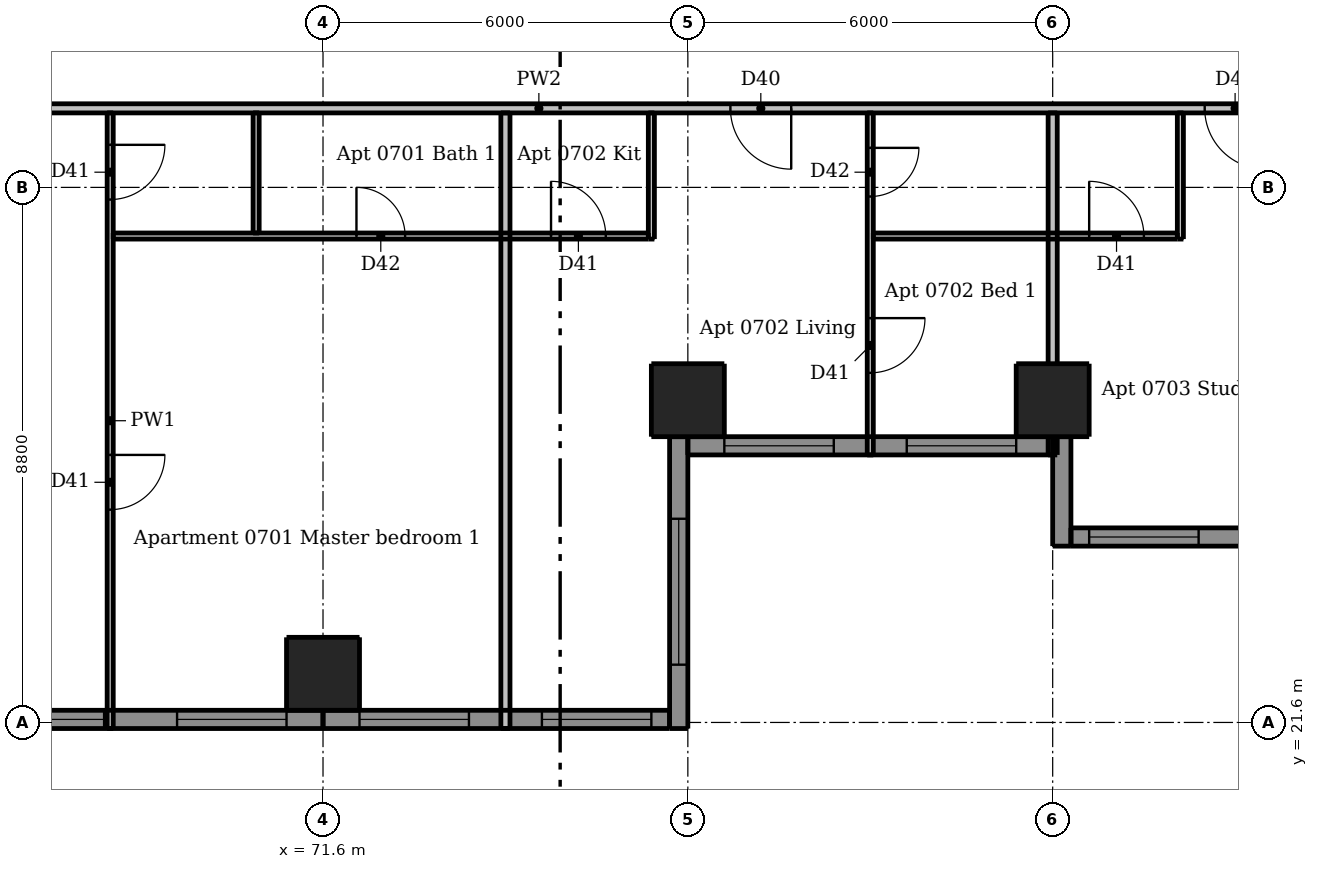
"""IFC4 building model, lengths in metres.
Left out: names, types, materials, properties, quantities, classifications, styles, units other than length and angle.
Written with IfcOpenShell. Run it as: python <this file> out.ifc"""

import sys

from ifc_helpers import new_model, si_unit, direction, frame, frame_2d, origin, origin_2d, place, context, subcontext, project, spatial, rectangle, extrude, element, fill, save


model = new_model("IFC4")
c1 = context("Model", 3, precision=1e-05, world=origin(), true_north=direction((0.0, 1.0)))
c2 = subcontext(c1, "Body", "Model", "MODEL_VIEW")
j1 = project(units=[si_unit("LENGTHUNIT", "METRE"), si_unit("PLANEANGLEUNIT", "RADIAN")], contexts=[c1])
p1 = place(None, origin())
s1 = spatial("IfcSite", under=j1, at=p1, CompositionType="ELEMENT")
p2 = place(p1, origin())
s2 = spatial("IfcBuilding", under=s1, at=p2, CompositionType="ELEMENT")
p3 = place(p2, frame((0.0, 0.0, 30.1)))
s3 = spatial("IfcBuildingStorey", under=s2, at=p3, CompositionType="ELEMENT", Elevation=30.1)
for number, where, z_axis, x_axis in (
    (1, (71.6, 22.4, 0.0), (0.0, 0.0, 1.0), (1.0, 0.0, 0.0)),
    (2, (77.6, 26.9, 0.0), (0.0, 0.0, 1.0), (1.0, 0.0, 0.0)),
    (3, (83.6, 26.9, 0.0), (0.0, 0.0, 1.0), (1.0, 0.0, 0.0)),
):
    element("IfcColumn", number, at=place(p3, frame(where, z_axis=z_axis, x_axis=x_axis)), inside=s3, PredefinedType="COLUMN", context=c2, shape_type="SweptSolid", body=[
        extrude(rectangle(XDim=1.2, YDim=1.2, at=origin_2d()), origin(), (0.0, 0.0, 1.0), 3.05),
    ])
p4 = place(p3, frame((77.45, 21.5, 0.0), z_axis=(0.0, 0.0, 1.0), x_axis=(0.0, 1.0, 0.0)))
e4 = element("IfcWall", 4, at=p4, inside=s3, PredefinedType="SOLIDWALL", context=c2, shape_type="SweptSolid", body=[
    extrude(rectangle(XDim=4.8, YDim=0.3, at=frame_2d((2.4, 0.0))), origin(), (0.0, 0.0, 1.0), 3.05),
])
p5 = place(p4, frame((1.05, 0.0, 0.15)))
e5 = element("IfcOpeningElement", 5, at=p5, cuts=e4, PredefinedType="OPENING", context=c2, shape_type="SweptSolid", body=[
    extrude(rectangle(XDim=2.4, YDim=2.1, at=frame_2d((1.2, 1.05))), frame((0.0, 0.16, 0.0), z_axis=(0.0, -1.0, 0.0), x_axis=(1.0, 0.0, 0.0)), (0.0, 0.0, 1.0), 0.32),
])
p6 = place(p3, frame((83.75, 26.3, 0.0), z_axis=(0.0, 0.0, 1.0), x_axis=(0.0, -1.0, 0.0)))
e6 = element("IfcWall", 6, at=p6, inside=s3, PredefinedType="SOLIDWALL", context=c2, shape_type="SweptSolid", body=[
    extrude(rectangle(XDim=1.8, YDim=0.3, at=frame_2d((0.9, 0.0))), origin(), (0.0, 0.0, 1.0), 3.05),
])
p7 = place(p3, frame((65.6, 21.65, 0.0), z_axis=(0.0, 0.0, 1.0), x_axis=(1.0, 0.0, 0.0)))
e7 = element("IfcWall", 7, at=p7, inside=s3, PredefinedType="SOLIDWALL", context=c2, shape_type="SweptSolid", body=[
    extrude(rectangle(XDim=6.0, YDim=0.3, at=frame_2d((3.0, 0.0))), origin(), (0.0, 0.0, 1.0), 3.05),
])
p8 = place(p7, frame((0.6, 0.0, 0.15)))
e8 = element("IfcOpeningElement", 8, at=p8, cuts=e7, PredefinedType="OPENING", context=c2, shape_type="SweptSolid", body=[
    extrude(rectangle(XDim=1.8, YDim=2.1, at=frame_2d((0.9, 1.05))), frame((0.0, 0.16, 0.0), z_axis=(0.0, -1.0, 0.0), x_axis=(1.0, 0.0, 0.0)), (0.0, 0.0, 1.0), 0.32),
])
p9 = place(p7, frame((3.6, 0.0, 0.15)))
e9 = element("IfcOpeningElement", 9, at=p9, cuts=e7, PredefinedType="OPENING", context=c2, shape_type="SweptSolid", body=[
    extrude(rectangle(XDim=1.8, YDim=2.1, at=frame_2d((0.9, 1.05))), frame((0.0, 0.16, 0.0), z_axis=(0.0, -1.0, 0.0), x_axis=(1.0, 0.0, 0.0)), (0.0, 0.0, 1.0), 0.32),
])
p10 = place(p3, frame((71.6, 21.65, 0.0), z_axis=(0.0, 0.0, 1.0), x_axis=(1.0, 0.0, 0.0)))
e10 = element("IfcWall", 10, at=p10, inside=s3, PredefinedType="SOLIDWALL", context=c2, shape_type="SweptSolid", body=[
    extrude(rectangle(XDim=5.7, YDim=0.3, at=frame_2d((2.85, 0.0))), origin(), (0.0, 0.0, 1.0), 3.05),
])
p11 = place(p10, frame((0.6, 0.0, 0.15)))
e11 = element("IfcOpeningElement", 11, at=p11, cuts=e10, PredefinedType="OPENING", context=c2, shape_type="SweptSolid", body=[
    extrude(rectangle(XDim=1.8, YDim=2.1, at=frame_2d((0.9, 1.05))), frame((0.0, 0.16, 0.0), z_axis=(0.0, -1.0, 0.0), x_axis=(1.0, 0.0, 0.0)), (0.0, 0.0, 1.0), 0.32),
])
p12 = place(p10, frame((3.6, 0.0, 0.15)))
e12 = element("IfcOpeningElement", 12, at=p12, cuts=e10, PredefinedType="OPENING", context=c2, shape_type="SweptSolid", body=[
    extrude(rectangle(XDim=1.8, YDim=2.1, at=frame_2d((0.9, 1.05))), frame((0.0, 0.16, 0.0), z_axis=(0.0, -1.0, 0.0), x_axis=(1.0, 0.0, 0.0)), (0.0, 0.0, 1.0), 0.32),
])
p13 = place(p3, frame((77.6, 26.15, 0.0), z_axis=(0.0, 0.0, 1.0), x_axis=(1.0, 0.0, 0.0)))
e13 = element("IfcWall", 13, at=p13, inside=s3, PredefinedType="SOLIDWALL", context=c2, shape_type="SweptSolid", body=[
    extrude(rectangle(XDim=6.0, YDim=0.3, at=frame_2d((3.0, 0.0))), origin(), (0.0, 0.0, 1.0), 3.05),
])
p14 = place(p13, frame((0.6, 0.0, 0.15)))
e14 = element("IfcOpeningElement", 14, at=p14, cuts=e13, PredefinedType="OPENING", context=c2, shape_type="SweptSolid", body=[
    extrude(rectangle(XDim=1.8, YDim=2.1, at=frame_2d((0.9, 1.05))), frame((0.0, 0.16, 0.0), z_axis=(0.0, -1.0, 0.0), x_axis=(1.0, 0.0, 0.0)), (0.0, 0.0, 1.0), 0.32),
])
p15 = place(p13, frame((3.6, 0.0, 0.15)))
e15 = element("IfcOpeningElement", 15, at=p15, cuts=e13, PredefinedType="OPENING", context=c2, shape_type="SweptSolid", body=[
    extrude(rectangle(XDim=1.8, YDim=2.1, at=frame_2d((0.9, 1.05))), frame((0.0, 0.16, 0.0), z_axis=(0.0, -1.0, 0.0), x_axis=(1.0, 0.0, 0.0)), (0.0, 0.0, 1.0), 0.32),
])
p16 = place(p3, frame((83.9, 24.65, 0.0), z_axis=(0.0, 0.0, 1.0), x_axis=(1.0, 0.0, 0.0)))
e16 = element("IfcWall", 16, at=p16, inside=s3, PredefinedType="SOLIDWALL", context=c2, shape_type="SweptSolid", body=[
    extrude(rectangle(XDim=6.0, YDim=0.3, at=frame_2d((3.0, 0.0))), origin(), (0.0, 0.0, 1.0), 3.05),
])
p17 = place(p16, frame((0.3, 0.0, 0.15)))
e17 = element("IfcOpeningElement", 17, at=p17, cuts=e16, PredefinedType="OPENING", context=c2, shape_type="SweptSolid", body=[
    extrude(rectangle(XDim=1.8, YDim=2.1, at=frame_2d((0.9, 1.05))), frame((0.0, 0.16, 0.0), z_axis=(0.0, -1.0, 0.0), x_axis=(1.0, 0.0, 0.0)), (0.0, 0.0, 1.0), 0.32),
])
p18 = place(p16, frame((3.3, 0.0, 0.15)))
e18 = element("IfcOpeningElement", 18, at=p18, cuts=e16, PredefinedType="OPENING", context=c2, shape_type="SweptSolid", body=[
    extrude(rectangle(XDim=1.8, YDim=2.1, at=frame_2d((0.9, 1.05))), frame((0.0, 0.16, 0.0), z_axis=(0.0, -1.0, 0.0), x_axis=(1.0, 0.0, 0.0)), (0.0, 0.0, 1.0), 0.32),
])
p19 = place(p3, frame((68.1, 31.625, 0.0), z_axis=(0.0, 0.0, 1.0), x_axis=(0.0, -1.0, 0.0)))
e19 = element("IfcWall", 19, at=p19, inside=s3, PredefinedType="PARTITIONING", context=c2, shape_type="SweptSolid", body=[
    extrude(rectangle(XDim=10.125, YDim=0.1, at=frame_2d((5.062, 0.0))), origin(), (0.0, 0.0, 1.0), 3.05),
])
p20 = place(p19, frame((0.525, 0.0, 0.0)))
e20 = element("IfcOpeningElement", 20, at=p20, cuts=e19, PredefinedType="OPENING", context=c2, shape_type="SweptSolid", body=[
    extrude(rectangle(XDim=0.9, YDim=2.1, at=frame_2d((0.45, 1.05))), frame((0.0, 0.06, 0.0), z_axis=(0.0, -1.0, 0.0), x_axis=(1.0, 0.0, 0.0)), (0.0, 0.0, 1.0), 0.12),
])
p21 = place(p19, frame((5.625, 0.0, 0.0)))
e21 = element("IfcOpeningElement", 21, at=p21, cuts=e19, PredefinedType="OPENING", context=c2, shape_type="SweptSolid", body=[
    extrude(rectangle(XDim=0.9, YDim=2.1, at=frame_2d((0.45, 1.05))), frame((0.0, 0.06, 0.0), z_axis=(0.0, -1.0, 0.0), x_axis=(1.0, 0.0, 0.0)), (0.0, 0.0, 1.0), 0.12),
])
p22 = place(p3, frame((70.5, 29.65, 0.0), z_axis=(0.0, 0.0, 1.0), x_axis=(0.0, 1.0, 0.0)))
e22 = element("IfcWall", 22, at=p22, inside=s3, PredefinedType="PARTITIONING", context=c2, shape_type="SweptSolid", body=[
    extrude(rectangle(XDim=1.975, YDim=0.1, at=frame_2d((0.988, 0.0))), origin(), (0.0, 0.0, 1.0), 3.05),
])
p23 = place(p3, frame((77.0, 29.55, 0.0), z_axis=(0.0, 0.0, 1.0), x_axis=(0.0, 1.0, 0.0)))
e23 = element("IfcWall", 23, at=p23, inside=s3, PredefinedType="PARTITIONING", context=c2, shape_type="SweptSolid", body=[
    extrude(rectangle(XDim=2.075, YDim=0.1, at=frame_2d((1.038, 0.0))), origin(), (0.0, 0.0, 1.0), 3.05),
])
p24 = place(p3, frame((80.6, 31.625, 0.0), z_axis=(0.0, 0.0, 1.0), x_axis=(0.0, -1.0, 0.0)))
e24 = element("IfcWall", 24, at=p24, inside=s3, PredefinedType="PARTITIONING", context=c2, shape_type="SweptSolid", body=[
    extrude(rectangle(XDim=5.625, YDim=0.1, at=frame_2d((2.812, 0.0))), origin(), (0.0, 0.0, 1.0), 3.05),
])
p25 = place(p24, frame((3.375, 0.0, 0.0)))
e25 = element("IfcOpeningElement", 25, at=p25, cuts=e24, PredefinedType="OPENING", context=c2, shape_type="SweptSolid", body=[
    extrude(rectangle(XDim=0.9, YDim=2.1, at=frame_2d((0.45, 1.05))), frame((0.0, 0.06, 0.0), z_axis=(0.0, -1.0, 0.0), x_axis=(1.0, 0.0, 0.0)), (0.0, 0.0, 1.0), 0.12),
])
p26 = place(p24, frame((0.575, 0.0, 0.0)))
e26 = element("IfcOpeningElement", 26, at=p26, cuts=e24, PredefinedType="OPENING", context=c2, shape_type="SweptSolid", body=[
    extrude(rectangle(XDim=0.8, YDim=2.1, at=frame_2d((0.4, 1.05))), frame((0.0, 0.06, 0.0), z_axis=(0.0, -1.0, 0.0), x_axis=(1.0, 0.0, 0.0)), (0.0, 0.0, 1.0), 0.12),
])
p27 = place(p3, frame((85.7, 29.55, 0.0), z_axis=(0.0, 0.0, 1.0), x_axis=(0.0, 1.0, 0.0)))
e27 = element("IfcWall", 27, at=p27, inside=s3, PredefinedType="PARTITIONING", context=c2, shape_type="SweptSolid", body=[
    extrude(rectangle(XDim=2.075, YDim=0.1, at=frame_2d((1.038, 0.0))), origin(), (0.0, 0.0, 1.0), 3.05),
])
p28 = place(p3, frame((68.15, 29.6, 0.0), z_axis=(0.0, 0.0, 1.0), x_axis=(1.0, 0.0, 0.0)))
e28 = element("IfcWall", 28, at=p28, inside=s3, PredefinedType="PARTITIONING", context=c2, shape_type="SweptSolid", body=[
    extrude(rectangle(XDim=8.8, YDim=0.1, at=frame_2d((4.4, 0.0))), origin(), (0.0, 0.0, 1.0), 3.05),
])
p29 = place(p28, frame((4.0, 0.0, 0.0)))
e29 = element("IfcOpeningElement", 29, at=p29, cuts=e28, PredefinedType="OPENING", context=c2, shape_type="SweptSolid", body=[
    extrude(rectangle(XDim=0.8, YDim=2.1, at=frame_2d((0.4, 1.05))), frame((0.0, 0.06, 0.0), z_axis=(0.0, -1.0, 0.0), x_axis=(1.0, 0.0, 0.0)), (0.0, 0.0, 1.0), 0.12),
])
p30 = place(p28, frame((7.2, 0.0, 0.0)))
e30 = element("IfcOpeningElement", 30, at=p30, cuts=e28, PredefinedType="OPENING", context=c2, shape_type="SweptSolid", body=[
    extrude(rectangle(XDim=0.9, YDim=2.1, at=frame_2d((0.45, 1.05))), frame((0.0, 0.06, 0.0), z_axis=(0.0, -1.0, 0.0), x_axis=(1.0, 0.0, 0.0)), (0.0, 0.0, 1.0), 0.12),
])
p31 = place(p3, frame((80.65, 29.6, 0.0), z_axis=(0.0, 0.0, 1.0), x_axis=(1.0, 0.0, 0.0)))
e31 = element("IfcWall", 31, at=p31, inside=s3, PredefinedType="PARTITIONING", context=c2, shape_type="SweptSolid", body=[
    extrude(rectangle(XDim=5.0, YDim=0.1, at=frame_2d((2.5, 0.0))), origin(), (0.0, 0.0, 1.0), 3.05),
])
p32 = place(p31, frame((3.55, 0.0, 0.0)))
e32 = element("IfcOpeningElement", 32, at=p32, cuts=e31, PredefinedType="OPENING", context=c2, shape_type="SweptSolid", body=[
    extrude(rectangle(XDim=0.9, YDim=2.1, at=frame_2d((0.45, 1.05))), frame((0.0, 0.06, 0.0), z_axis=(0.0, -1.0, 0.0), x_axis=(1.0, 0.0, 0.0)), (0.0, 0.0, 1.0), 0.12),
])
p33 = place(p3, frame((74.6, 21.5, 0.0), z_axis=(0.0, 0.0, 1.0), x_axis=(0.0, 1.0, 0.0)))
e33 = element("IfcWall", 33, at=p33, inside=s3, PredefinedType="PARTITIONING", context=c2, shape_type="SweptSolid", body=[
    extrude(rectangle(XDim=10.125, YDim=0.15, at=frame_2d((5.062, 0.0))), origin(), (0.0, 0.0, 1.0), 3.05),
])
p34 = place(p3, frame((83.6, 26.0, 0.0), z_axis=(0.0, 0.0, 1.0), x_axis=(0.0, 1.0, 0.0)))
e34 = element("IfcWall", 34, at=p34, inside=s3, PredefinedType="PARTITIONING", context=c2, shape_type="SweptSolid", body=[
    extrude(rectangle(XDim=5.625, YDim=0.15, at=frame_2d((2.812, 0.0))), origin(), (0.0, 0.0, 1.0), 2.647),
])
p35 = place(p3, frame((89.525, 31.7, 0.0), z_axis=(0.0, 0.0, 1.0), x_axis=(-1.0, 0.0, 0.0)))
e35 = element("IfcWall", 35, at=p35, inside=s3, PredefinedType="PARTITIONING", context=c2, shape_type="SweptSolid", body=[
    extrude(rectangle(XDim=28.75, YDim=0.15, at=frame_2d((14.375, 0.0))), origin(), (0.0, 0.0, 1.0), 3.05),
])
p36 = place(p35, frame((24.625, 0.0, 0.0)))
e36 = element("IfcOpeningElement", 36, at=p36, cuts=e35, PredefinedType="OPENING", context=c2, shape_type="SweptSolid", body=[
    extrude(rectangle(XDim=1.0, YDim=2.1, at=frame_2d((0.5, 1.05))), frame((0.0, 0.085, 0.0), z_axis=(0.0, -1.0, 0.0), x_axis=(1.0, 0.0, 0.0)), (0.0, 0.0, 1.0), 0.17),
])
p37 = place(p35, frame((10.225, 0.0, 0.0)))
e37 = element("IfcOpeningElement", 37, at=p37, cuts=e35, PredefinedType="OPENING", context=c2, shape_type="SweptSolid", body=[
    extrude(rectangle(XDim=1.0, YDim=2.1, at=frame_2d((0.5, 1.05))), frame((0.0, 0.085, 0.0), z_axis=(0.0, -1.0, 0.0), x_axis=(1.0, 0.0, 0.0)), (0.0, 0.0, 1.0), 0.17),
])
p38 = place(p35, frame((2.425, 0.0, 0.0)))
e38 = element("IfcOpeningElement", 38, at=p38, cuts=e35, PredefinedType="OPENING", context=c2, shape_type="SweptSolid", body=[
    extrude(rectangle(XDim=1.0, YDim=2.1, at=frame_2d((0.5, 1.05))), frame((0.0, 0.085, 0.0), z_axis=(0.0, -1.0, 0.0), x_axis=(1.0, 0.0, 0.0)), (0.0, 0.0, 1.0), 0.17),
])
p39 = place(p5, origin())
e39 = element("IfcWindow", 39, at=p39, inside=s3, PartitioningType="DOUBLE_PANEL_VERTICAL", PredefinedType="WINDOW", context=c2, shape_type="SweptSolid", body=[
    extrude(rectangle(XDim=2.4, YDim=2.1, at=frame_2d((1.2, 1.05))), frame((0.0, 0.03, 0.0), z_axis=(0.0, -1.0, 0.0), x_axis=(1.0, 0.0, 0.0)), (0.0, 0.0, 1.0), 0.06),
])
fill(e5, e39)
p40 = place(p8, origin())
e40 = element("IfcWindow", 40, at=p40, inside=s3, PartitioningType="DOUBLE_PANEL_VERTICAL", PredefinedType="WINDOW", context=c2, shape_type="SweptSolid", body=[
    extrude(rectangle(XDim=1.8, YDim=2.1, at=frame_2d((0.9, 1.05))), frame((0.0, 0.03, 0.0), z_axis=(0.0, -1.0, 0.0), x_axis=(1.0, 0.0, 0.0)), (0.0, 0.0, 1.0), 0.06),
])
fill(e8, e40)
p41 = place(p9, origin())
e41 = element("IfcWindow", 41, at=p41, inside=s3, PartitioningType="DOUBLE_PANEL_VERTICAL", PredefinedType="WINDOW", context=c2, shape_type="SweptSolid", body=[
    extrude(rectangle(XDim=1.8, YDim=2.1, at=frame_2d((0.9, 1.05))), frame((0.0, 0.03, 0.0), z_axis=(0.0, -1.0, 0.0), x_axis=(1.0, 0.0, 0.0)), (0.0, 0.0, 1.0), 0.06),
])
fill(e9, e41)
p42 = place(p11, origin())
e42 = element("IfcWindow", 42, at=p42, inside=s3, PartitioningType="DOUBLE_PANEL_VERTICAL", PredefinedType="WINDOW", context=c2, shape_type="SweptSolid", body=[
    extrude(rectangle(XDim=1.8, YDim=2.1, at=frame_2d((0.9, 1.05))), frame((0.0, 0.03, 0.0), z_axis=(0.0, -1.0, 0.0), x_axis=(1.0, 0.0, 0.0)), (0.0, 0.0, 1.0), 0.06),
])
fill(e11, e42)
p43 = place(p12, origin())
e43 = element("IfcWindow", 43, at=p43, inside=s3, PartitioningType="DOUBLE_PANEL_VERTICAL", PredefinedType="WINDOW", context=c2, shape_type="SweptSolid", body=[
    extrude(rectangle(XDim=1.8, YDim=2.1, at=frame_2d((0.9, 1.05))), frame((0.0, 0.03, 0.0), z_axis=(0.0, -1.0, 0.0), x_axis=(1.0, 0.0, 0.0)), (0.0, 0.0, 1.0), 0.06),
])
fill(e12, e43)
p44 = place(p14, origin())
e44 = element("IfcWindow", 44, at=p44, inside=s3, PartitioningType="DOUBLE_PANEL_VERTICAL", PredefinedType="WINDOW", context=c2, shape_type="SweptSolid", body=[
    extrude(rectangle(XDim=1.8, YDim=2.1, at=frame_2d((0.9, 1.05))), frame((0.0, 0.03, 0.0), z_axis=(0.0, -1.0, 0.0), x_axis=(1.0, 0.0, 0.0)), (0.0, 0.0, 1.0), 0.06),
])
fill(e14, e44)
p45 = place(p15, origin())
e45 = element("IfcWindow", 45, at=p45, inside=s3, PartitioningType="DOUBLE_PANEL_VERTICAL", PredefinedType="WINDOW", context=c2, shape_type="SweptSolid", body=[
    extrude(rectangle(XDim=1.8, YDim=2.1, at=frame_2d((0.9, 1.05))), frame((0.0, 0.03, 0.0), z_axis=(0.0, -1.0, 0.0), x_axis=(1.0, 0.0, 0.0)), (0.0, 0.0, 1.0), 0.06),
])
fill(e15, e45)
p46 = place(p17, origin())
e46 = element("IfcWindow", 46, at=p46, inside=s3, PartitioningType="DOUBLE_PANEL_VERTICAL", PredefinedType="WINDOW", context=c2, shape_type="SweptSolid", body=[
    extrude(rectangle(XDim=1.8, YDim=2.1, at=frame_2d((0.9, 1.05))), frame((0.0, 0.03, 0.0), z_axis=(0.0, -1.0, 0.0), x_axis=(1.0, 0.0, 0.0)), (0.0, 0.0, 1.0), 0.06),
])
fill(e17, e46)
p47 = place(p20, origin())
e47 = element("IfcDoor", 47, at=p47, inside=s3, OperationType="SINGLE_SWING_LEFT", PredefinedType="DOOR", context=c2, shape_type="SweptSolid", body=[
    extrude(rectangle(XDim=0.9, YDim=2.1, at=frame_2d((0.45, 1.05))), frame((0.0, 0.025, 0.0), z_axis=(0.0, -1.0, 0.0), x_axis=(1.0, 0.0, 0.0)), (0.0, 0.0, 1.0), 0.05),
])
fill(e20, e47)
p48 = place(p21, origin())
e48 = element("IfcDoor", 48, at=p48, inside=s3, OperationType="SINGLE_SWING_LEFT", PredefinedType="DOOR", context=c2, shape_type="SweptSolid", body=[
    extrude(rectangle(XDim=0.9, YDim=2.1, at=frame_2d((0.45, 1.05))), frame((0.0, 0.025, 0.0), z_axis=(0.0, -1.0, 0.0), x_axis=(1.0, 0.0, 0.0)), (0.0, 0.0, 1.0), 0.05),
])
fill(e21, e48)
p49 = place(p29, origin())
e49 = element("IfcDoor", 49, at=p49, inside=s3, OperationType="SINGLE_SWING_LEFT", PredefinedType="DOOR", context=c2, shape_type="SweptSolid", body=[
    extrude(rectangle(XDim=0.8, YDim=2.1, at=frame_2d((0.4, 1.05))), frame((0.0, 0.025, 0.0), z_axis=(0.0, -1.0, 0.0), x_axis=(1.0, 0.0, 0.0)), (0.0, 0.0, 1.0), 0.05),
])
fill(e29, e49)
p50 = place(p37, origin())
e50 = element("IfcDoor", 50, at=p50, inside=s3, OperationType="SINGLE_SWING_LEFT", PredefinedType="DOOR", context=c2, shape_type="SweptSolid", body=[
    extrude(rectangle(XDim=1.0, YDim=2.1, at=frame_2d((0.5, 1.05))), frame((0.0, 0.025, 0.0), z_axis=(0.0, -1.0, 0.0), x_axis=(1.0, 0.0, 0.0)), (0.0, 0.0, 1.0), 0.05),
])
fill(e37, e50)
p51 = place(p30, origin())
e51 = element("IfcDoor", 51, at=p51, inside=s3, OperationType="SINGLE_SWING_LEFT", PredefinedType="DOOR", context=c2, shape_type="SweptSolid", body=[
    extrude(rectangle(XDim=0.9, YDim=2.1, at=frame_2d((0.45, 1.05))), frame((0.0, 0.025, 0.0), z_axis=(0.0, -1.0, 0.0), x_axis=(1.0, 0.0, 0.0)), (0.0, 0.0, 1.0), 0.05),
])
fill(e30, e51)
p52 = place(p25, origin())
e52 = element("IfcDoor", 52, at=p52, inside=s3, OperationType="SINGLE_SWING_LEFT", PredefinedType="DOOR", context=c2, shape_type="SweptSolid", body=[
    extrude(rectangle(XDim=0.9, YDim=2.1, at=frame_2d((0.45, 1.05))), frame((0.0, 0.025, 0.0), z_axis=(0.0, -1.0, 0.0), x_axis=(1.0, 0.0, 0.0)), (0.0, 0.0, 1.0), 0.05),
])
fill(e25, e52)
p53 = place(p26, origin())
e53 = element("IfcDoor", 53, at=p53, inside=s3, OperationType="SINGLE_SWING_LEFT", PredefinedType="DOOR", context=c2, shape_type="SweptSolid", body=[
    extrude(rectangle(XDim=0.8, YDim=2.1, at=frame_2d((0.4, 1.05))), frame((0.0, 0.025, 0.0), z_axis=(0.0, -1.0, 0.0), x_axis=(1.0, 0.0, 0.0)), (0.0, 0.0, 1.0), 0.05),
])
fill(e26, e53)
p54 = place(p38, origin())
e54 = element("IfcDoor", 54, at=p54, inside=s3, OperationType="SINGLE_SWING_LEFT", PredefinedType="DOOR", context=c2, shape_type="SweptSolid", body=[
    extrude(rectangle(XDim=1.0, YDim=2.1, at=frame_2d((0.5, 1.05))), frame((0.0, 0.025, 0.0), z_axis=(0.0, -1.0, 0.0), x_axis=(1.0, 0.0, 0.0)), (0.0, 0.0, 1.0), 0.05),
])
fill(e38, e54)
p55 = place(p32, origin())
e55 = element("IfcDoor", 55, at=p55, inside=s3, OperationType="SINGLE_SWING_LEFT", PredefinedType="DOOR", context=c2, shape_type="SweptSolid", body=[
    extrude(rectangle(XDim=0.9, YDim=2.1, at=frame_2d((0.45, 1.05))), frame((0.0, 0.025, 0.0), z_axis=(0.0, -1.0, 0.0), x_axis=(1.0, 0.0, 0.0)), (0.0, 0.0, 1.0), 0.05),
])
fill(e32, e55)
save(model, sys.argv[1])
